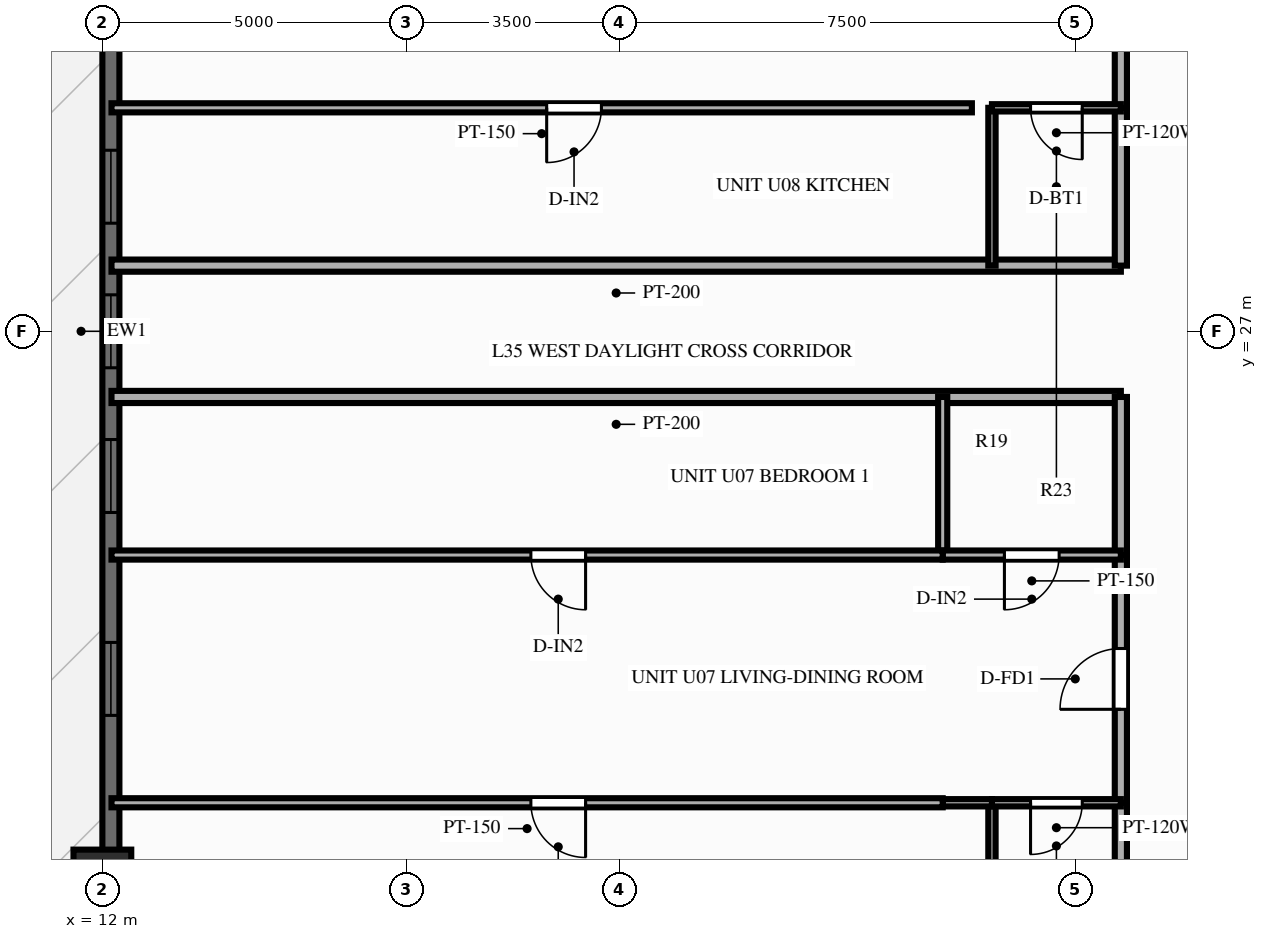
"""IFC4 building model, lengths in metres.
Left out: names, types, materials, properties, quantities, classifications, styles, units other than length and angle.
Written with IfcOpenShell. Run it as: python <this file> out.ifc"""

import sys

from ifc_helpers import new_model, si_unit, direction, frame, frame_2d, origin, origin_2d, place, context, subcontext, project, spatial, rectangle, extrude, source, transform, mapped, element, fill, save


model = new_model("IFC4")
c1 = context("Model", 3, precision=1e-05, world=origin(), true_north=direction((0.0, 1.0)))
c2 = subcontext(c1, "Body", "Model", "MODEL_VIEW")
j1 = project(units=[si_unit("LENGTHUNIT", "METRE"), si_unit("PLANEANGLEUNIT", "RADIAN")], contexts=[c1])
p1 = place(None, origin())
s1 = spatial("IfcSite", under=j1, at=p1, CompositionType="ELEMENT")
p2 = place(p1, origin())
s2 = spatial("IfcBuilding", under=s1, at=p2, CompositionType="ELEMENT")
p3 = place(p2, frame((0.0, 0.0, 110.85)))
s3 = spatial("IfcBuildingStorey", under=s2, at=p3, CompositionType="ELEMENT", Elevation=110.85)
m1 = source(origin(), c2, "Body", "SweptSolid", [
    extrude(rectangle(XDim=0.95, YDim=0.95, at=origin_2d()), origin(), (0.0, 0.0, 1.0), 3.0),
])
p4 = place(p3, frame((12.0, 18.0, 0.0), z_axis=(0.0, 0.0, 1.0), x_axis=(1.0, 0.0, 0.0)))
e1 = element("IfcColumn", 1, at=p4, inside=s3, PredefinedType="COLUMN", context=c2, shape_type="MappedRepresentation", body=[
    mapped(m1, transform((0.0, 0.0, 0.0), scale=1.0)),
])
p5 = place(p3, frame((12.14, 7.2, 0.0), z_axis=(0.0, 0.0, 1.0), x_axis=(0.0, 1.0, 0.0)))
e2 = element("IfcWall", 2, at=p5, inside=s3, PredefinedType="SOLIDWALL", context=c2, shape_type="SweptSolid", body=[
    extrude(rectangle(XDim=39.6, YDim=0.28, at=frame_2d((19.8, 0.0))), origin(), (0.0, 0.0, 1.0), 2.28),
])
p6 = place(p5, frame((0.945, 0.0, 0.25)))
e3 = element("IfcOpeningElement", 3, at=p6, cuts=e2, PredefinedType="OPENING", context=c2, shape_type="SweptSolid", body=[
    extrude(rectangle(XDim=1.2, YDim=1.5, at=frame_2d((0.6, 0.75))), frame((0.0, 0.152, 0.0), z_axis=(0.0, -1.0, 0.0), x_axis=(1.0, 0.0, 0.0)), (0.0, 0.0, 1.0), 0.304),
])
p7 = place(p5, frame((4.213, 0.0, 0.25)))
e4 = element("IfcOpeningElement", 4, at=p7, cuts=e2, PredefinedType="OPENING", context=c2, shape_type="SweptSolid", body=[
    extrude(rectangle(XDim=1.2, YDim=1.5, at=frame_2d((0.6, 0.75))), frame((0.0, 0.152, 0.0), z_axis=(0.0, -1.0, 0.0), x_axis=(1.0, 0.0, 0.0)), (0.0, 0.0, 1.0), 0.304),
])
p8 = place(p5, frame((7.55, 0.0, 0.25)))
e5 = element("IfcOpeningElement", 5, at=p8, cuts=e2, PredefinedType="OPENING", context=c2, shape_type="SweptSolid", body=[
    extrude(rectangle(XDim=1.2, YDim=1.5, at=frame_2d((0.6, 0.75))), frame((0.0, 0.152, 0.0), z_axis=(0.0, -1.0, 0.0), x_axis=(1.0, 0.0, 0.0)), (0.0, 0.0, 1.0), 0.304),
])
p9 = place(p5, frame((13.483, 0.0, 0.25)))
e6 = element("IfcOpeningElement", 6, at=p9, cuts=e2, PredefinedType="OPENING", context=c2, shape_type="SweptSolid", body=[
    extrude(rectangle(XDim=1.2, YDim=1.5, at=frame_2d((0.6, 0.75))), frame((0.0, 0.152, 0.0), z_axis=(0.0, -1.0, 0.0), x_axis=(1.0, 0.0, 0.0)), (0.0, 0.0, 1.0), 0.304),
])
p10 = place(p5, frame((16.82, 0.0, 0.25)))
e7 = element("IfcOpeningElement", 7, at=p10, cuts=e2, PredefinedType="OPENING", context=c2, shape_type="SweptSolid", body=[
    extrude(rectangle(XDim=1.2, YDim=1.5, at=frame_2d((0.6, 0.75))), frame((0.0, 0.152, 0.0), z_axis=(0.0, -1.0, 0.0), x_axis=(1.0, 0.0, 0.0)), (0.0, 0.0, 1.0), 0.304),
])
p11 = place(p5, frame((19.2, 0.0, 0.25)))
e8 = element("IfcOpeningElement", 8, at=p11, cuts=e2, PredefinedType="OPENING", context=c2, shape_type="SweptSolid", body=[
    extrude(rectangle(XDim=1.2, YDim=1.5, at=frame_2d((0.6, 0.75))), frame((0.0, 0.152, 0.0), z_axis=(0.0, -1.0, 0.0), x_axis=(1.0, 0.0, 0.0)), (0.0, 0.0, 1.0), 0.304),
])
p12 = place(p5, frame((21.578, 0.0, 0.25)))
e9 = element("IfcOpeningElement", 9, at=p12, cuts=e2, PredefinedType="OPENING", context=c2, shape_type="SweptSolid", body=[
    extrude(rectangle(XDim=1.2, YDim=1.5, at=frame_2d((0.6, 0.75))), frame((0.0, 0.152, 0.0), z_axis=(0.0, -1.0, 0.0), x_axis=(1.0, 0.0, 0.0)), (0.0, 0.0, 1.0), 0.304),
])
p13 = place(p5, frame((24.713, 0.0, 0.0)))
e10 = element("IfcOpeningElement", 10, at=p13, cuts=e2, PredefinedType="OPENING", context=c2, shape_type="SweptSolid", body=[
    extrude(rectangle(XDim=1.6, YDim=2.15, at=frame_2d((0.8, 1.075))), frame((0.0, 0.152, 0.0), z_axis=(0.0, -1.0, 0.0), x_axis=(1.0, 0.0, 0.0)), (0.0, 0.0, 1.0), 0.304),
])
p14 = place(p5, frame((29.305, 0.0, 0.25)))
e11 = element("IfcOpeningElement", 11, at=p14, cuts=e2, PredefinedType="OPENING", context=c2, shape_type="SweptSolid", body=[
    extrude(rectangle(XDim=0.7, YDim=1.5, at=frame_2d((0.35, 0.75))), frame((0.0, 0.152, 0.0), z_axis=(0.0, -1.0, 0.0), x_axis=(1.0, 0.0, 0.0)), (0.0, 0.0, 1.0), 0.304),
])
p15 = place(p5, frame((30.848, 0.0, 0.25)))
e12 = element("IfcOpeningElement", 12, at=p15, cuts=e2, PredefinedType="OPENING", context=c2, shape_type="SweptSolid", body=[
    extrude(rectangle(XDim=1.2, YDim=1.5, at=frame_2d((0.6, 0.75))), frame((0.0, 0.152, 0.0), z_axis=(0.0, -1.0, 0.0), x_axis=(1.0, 0.0, 0.0)), (0.0, 0.0, 1.0), 0.304),
])
p16 = place(p5, frame((34.183, 0.0, 0.25)))
e13 = element("IfcOpeningElement", 13, at=p16, cuts=e2, PredefinedType="OPENING", context=c2, shape_type="SweptSolid", body=[
    extrude(rectangle(XDim=1.2, YDim=1.5, at=frame_2d((0.6, 0.75))), frame((0.0, 0.152, 0.0), z_axis=(0.0, -1.0, 0.0), x_axis=(1.0, 0.0, 0.0)), (0.0, 0.0, 1.0), 0.304),
])
p17 = place(p5, frame((37.452, 0.0, 0.25)))
e14 = element("IfcOpeningElement", 14, at=p17, cuts=e2, PredefinedType="OPENING", context=c2, shape_type="SweptSolid", body=[
    extrude(rectangle(XDim=1.2, YDim=1.5, at=frame_2d((0.6, 0.75))), frame((0.0, 0.152, 0.0), z_axis=(0.0, -1.0, 0.0), x_axis=(1.0, 0.0, 0.0)), (0.0, 0.0, 1.0), 0.304),
])
p18 = place(p3, frame((28.75, 25.92, 0.0), z_axis=(0.0, 0.0, 1.0), x_axis=(-1.0, 0.0, 0.0)))
e15 = element("IfcWall", 15, at=p18, inside=s3, PredefinedType="PARTITIONING", context=c2, shape_type="SweptSolid", body=[
    extrude(rectangle(XDim=16.6, YDim=0.2, at=frame_2d((8.3, 0.0))), origin(), (0.0, 0.0, 1.0), 2.79),
])
p19 = place(p3, frame((28.75, 16.65, 0.0), z_axis=(0.0, 0.0, 1.0), x_axis=(0.0, 1.0, 0.0)))
e16 = element("IfcWall", 16, at=p19, inside=s3, PredefinedType="PARTITIONING", context=c2, shape_type="SweptSolid", body=[
    extrude(rectangle(XDim=2.596, YDim=0.2, at=frame_2d((1.298, 0.0))), origin(), (0.0, 0.0, 1.0), 2.79),
])
p20 = place(p3, frame((28.75, 19.246, 0.0), z_axis=(0.0, 0.0, 1.0), x_axis=(0.0, 1.0, 0.0)))
e17 = element("IfcWall", 17, at=p20, inside=s3, PredefinedType="PARTITIONING", context=c2, shape_type="SweptSolid", body=[
    extrude(rectangle(XDim=4.074, YDim=0.2, at=frame_2d((2.037, 0.0))), origin(), (0.0, 0.0, 1.0), 2.79),
])
p21 = place(p20, frame((1.537, 0.0, 0.0)))
e18 = element("IfcOpeningElement", 18, at=p21, cuts=e17, PredefinedType="OPENING", context=c2, shape_type="SweptSolid", body=[
    extrude(rectangle(XDim=1.0, YDim=2.15, at=frame_2d((0.5, 1.075))), frame((0.0, 0.112, 0.0), z_axis=(0.0, -1.0, 0.0), x_axis=(1.0, 0.0, 0.0)), (0.0, 0.0, 1.0), 0.224),
])
p22 = place(p3, frame((28.75, 23.32, 0.0), z_axis=(0.0, 0.0, 1.0), x_axis=(0.0, 1.0, 0.0)))
e19 = element("IfcWall", 19, at=p22, inside=s3, PredefinedType="PARTITIONING", context=c2, shape_type="SweptSolid", body=[
    extrude(rectangle(XDim=2.6, YDim=0.2, at=frame_2d((1.3, 0.0))), origin(), (0.0, 0.0, 1.0), 2.79),
])
p23 = place(p3, frame((26.63, 16.65, 0.0), z_axis=(0.0, 0.0, 1.0), x_axis=(0.0, 1.0, 0.0)))
e20 = element("IfcWall", 20, at=p23, inside=s3, PredefinedType="PARTITIONING", context=c2, shape_type="SweptSolid", body=[
    extrude(rectangle(XDim=2.596, YDim=0.12, at=frame_2d((1.298, 0.0))), origin(), (0.0, 0.0, 1.0), 2.79),
])
p24 = place(p3, frame((25.82, 23.32, 0.0), z_axis=(0.0, 0.0, 1.0), x_axis=(0.0, 1.0, 0.0)))
e21 = element("IfcWall", 21, at=p24, inside=s3, PredefinedType="PARTITIONING", context=c2, shape_type="SweptSolid", body=[
    extrude(rectangle(XDim=2.6, YDim=0.15, at=frame_2d((1.3, 0.0))), origin(), (0.0, 0.0, 1.0), 2.79),
])
p25 = place(p3, frame((28.75, 19.246, 0.0), z_axis=(0.0, 0.0, 1.0), x_axis=(-1.0, 0.0, 0.0)))
e22 = element("IfcWall", 22, at=p25, inside=s3, PredefinedType="PARTITIONING", context=c2, shape_type="SweptSolid", body=[
    extrude(rectangle(XDim=2.12, YDim=0.12, at=frame_2d((1.06, 0.0))), origin(), (0.0, 0.0, 1.0), 2.79),
])
p26 = place(p25, frame((0.635, 0.0, 0.0)))
e23 = element("IfcOpeningElement", 23, at=p26, cuts=e22, PredefinedType="OPENING", context=c2, shape_type="SweptSolid", body=[
    extrude(rectangle(XDim=0.85, YDim=2.05, at=frame_2d((0.425, 1.025))), frame((0.0, 0.072, 0.0), z_axis=(0.0, -1.0, 0.0), x_axis=(1.0, 0.0, 0.0)), (0.0, 0.0, 1.0), 0.144),
])
p27 = place(p3, frame((26.63, 19.246, 0.0), z_axis=(0.0, 0.0, 1.0), x_axis=(-1.0, 0.0, 0.0)))
e24 = element("IfcWall", 24, at=p27, inside=s3, PredefinedType="PARTITIONING", context=c2, shape_type="SweptSolid", body=[
    extrude(rectangle(XDim=0.81, YDim=0.12, at=frame_2d((0.405, 0.0))), origin(), (0.0, 0.0, 1.0), 2.79),
])
p28 = place(p3, frame((25.82, 19.246, 0.0), z_axis=(0.0, 0.0, 1.0), x_axis=(-1.0, 0.0, 0.0)))
e25 = element("IfcWall", 25, at=p28, inside=s3, PredefinedType="PARTITIONING", context=c2, shape_type="SweptSolid", body=[
    extrude(rectangle(XDim=13.67, YDim=0.15, at=frame_2d((6.835, 0.0))), origin(), (0.0, 0.0, 1.0), 2.79),
])
p29 = place(p28, frame((5.873, 0.0, 0.0)))
e26 = element("IfcOpeningElement", 26, at=p29, cuts=e25, PredefinedType="OPENING", context=c2, shape_type="SweptSolid", body=[
    extrude(rectangle(XDim=0.9, YDim=2.1, at=frame_2d((0.45, 1.05))), frame((0.0, 0.087, 0.0), z_axis=(0.0, -1.0, 0.0), x_axis=(1.0, 0.0, 0.0)), (0.0, 0.0, 1.0), 0.174),
])
p30 = place(p3, frame((28.75, 23.32, 0.0), z_axis=(0.0, 0.0, 1.0), x_axis=(-1.0, 0.0, 0.0)))
e27 = element("IfcWall", 27, at=p30, inside=s3, PredefinedType="PARTITIONING", context=c2, shape_type="SweptSolid", body=[
    extrude(rectangle(XDim=2.93, YDim=0.15, at=frame_2d((1.465, 0.0))), origin(), (0.0, 0.0, 1.0), 2.79),
])
p31 = place(p30, frame((1.015, 0.0, 0.0)))
e28 = element("IfcOpeningElement", 28, at=p31, cuts=e27, PredefinedType="OPENING", context=c2, shape_type="SweptSolid", body=[
    extrude(rectangle(XDim=0.9, YDim=2.1, at=frame_2d((0.45, 1.05))), frame((0.0, 0.087, 0.0), z_axis=(0.0, -1.0, 0.0), x_axis=(1.0, 0.0, 0.0)), (0.0, 0.0, 1.0), 0.174),
])
p32 = place(p3, frame((25.82, 23.32, 0.0), z_axis=(0.0, 0.0, 1.0), x_axis=(-1.0, 0.0, 0.0)))
e29 = element("IfcWall", 29, at=p32, inside=s3, PredefinedType="PARTITIONING", context=c2, shape_type="SweptSolid", body=[
    extrude(rectangle(XDim=13.67, YDim=0.15, at=frame_2d((6.835, 0.0))), origin(), (0.0, 0.0, 1.0), 2.79),
])
p33 = place(p32, frame((5.873, 0.0, 0.0)))
e30 = element("IfcOpeningElement", 30, at=p33, cuts=e29, PredefinedType="OPENING", context=c2, shape_type="SweptSolid", body=[
    extrude(rectangle(XDim=0.9, YDim=2.1, at=frame_2d((0.45, 1.05))), frame((0.0, 0.087, 0.0), z_axis=(0.0, -1.0, 0.0), x_axis=(1.0, 0.0, 0.0)), (0.0, 0.0, 1.0), 0.174),
])
p34 = place(p3, frame((28.75, 28.08, 0.0), z_axis=(0.0, 0.0, 1.0), x_axis=(-1.0, 0.0, 0.0)))
e31 = element("IfcWall", 31, at=p34, inside=s3, PredefinedType="PARTITIONING", context=c2, shape_type="SweptSolid", body=[
    extrude(rectangle(XDim=16.6, YDim=0.2, at=frame_2d((8.3, 0.0))), origin(), (0.0, 0.0, 1.0), 2.79),
])
p35 = place(p3, frame((28.75, 28.08, 0.0), z_axis=(0.0, 0.0, 1.0), x_axis=(0.0, 1.0, 0.0)))
e32 = element("IfcWall", 32, at=p35, inside=s3, PredefinedType="PARTITIONING", context=c2, shape_type="SweptSolid", body=[
    extrude(rectangle(XDim=2.595, YDim=0.2, at=frame_2d((1.298, 0.0))), origin(), (0.0, 0.0, 1.0), 2.79),
])
p36 = place(p3, frame((28.75, 30.676, 0.0), z_axis=(0.0, 0.0, 1.0), x_axis=(0.0, 1.0, 0.0)))
e33 = element("IfcWall", 33, at=p36, inside=s3, PredefinedType="PARTITIONING", context=c2, shape_type="SweptSolid", body=[
    extrude(rectangle(XDim=4.074, YDim=0.2, at=frame_2d((2.037, 0.0))), origin(), (0.0, 0.0, 1.0), 2.79),
])
p37 = place(p36, frame((1.537, 0.0, 0.0)))
e34 = element("IfcOpeningElement", 34, at=p37, cuts=e33, PredefinedType="OPENING", context=c2, shape_type="SweptSolid", body=[
    extrude(rectangle(XDim=1.0, YDim=2.15, at=frame_2d((0.5, 1.075))), frame((0.0, 0.112, 0.0), z_axis=(0.0, -1.0, 0.0), x_axis=(1.0, 0.0, 0.0)), (0.0, 0.0, 1.0), 0.224),
])
p38 = place(p3, frame((26.63, 28.08, 0.0), z_axis=(0.0, 0.0, 1.0), x_axis=(0.0, 1.0, 0.0)))
e35 = element("IfcWall", 35, at=p38, inside=s3, PredefinedType="PARTITIONING", context=c2, shape_type="SweptSolid", body=[
    extrude(rectangle(XDim=2.595, YDim=0.12, at=frame_2d((1.298, 0.0))), origin(), (0.0, 0.0, 1.0), 2.79),
])
p39 = place(p3, frame((28.75, 30.676, 0.0), z_axis=(0.0, 0.0, 1.0), x_axis=(-1.0, 0.0, 0.0)))
e36 = element("IfcWall", 36, at=p39, inside=s3, PredefinedType="PARTITIONING", context=c2, shape_type="SweptSolid", body=[
    extrude(rectangle(XDim=2.12, YDim=0.12, at=frame_2d((1.06, 0.0))), origin(), (0.0, 0.0, 1.0), 2.79),
])
p40 = place(p39, frame((0.635, 0.0, 0.0)))
e37 = element("IfcOpeningElement", 37, at=p40, cuts=e36, PredefinedType="OPENING", context=c2, shape_type="SweptSolid", body=[
    extrude(rectangle(XDim=0.85, YDim=2.05, at=frame_2d((0.425, 1.025))), frame((0.0, 0.072, 0.0), z_axis=(0.0, -1.0, 0.0), x_axis=(1.0, 0.0, 0.0)), (0.0, 0.0, 1.0), 0.144),
])
p41 = place(p3, frame((26.3, 30.676, 0.0), z_axis=(0.0, 0.0, 1.0), x_axis=(-1.0, 0.0, 0.0)))
e38 = element("IfcWall", 38, at=p41, inside=s3, PredefinedType="PARTITIONING", context=c2, shape_type="SweptSolid", body=[
    extrude(rectangle(XDim=14.15, YDim=0.15, at=frame_2d((7.075, 0.0))), origin(), (0.0, 0.0, 1.0), 2.79),
])
p42 = place(p41, frame((6.093, 0.0, 0.0)))
e39 = element("IfcOpeningElement", 39, at=p42, cuts=e38, PredefinedType="OPENING", context=c2, shape_type="SweptSolid", body=[
    extrude(rectangle(XDim=0.9, YDim=2.1, at=frame_2d((0.45, 1.05))), frame((0.0, 0.087, 0.0), z_axis=(0.0, -1.0, 0.0), x_axis=(1.0, 0.0, 0.0)), (0.0, 0.0, 1.0), 0.174),
])
m2 = source(origin(), c2, "Body", "SweptSolid", [
    extrude(rectangle(XDim=1.2, YDim=1.5, at=frame_2d((0.6, 0.75))), frame((0.0, 0.03, 0.0), z_axis=(0.0, -1.0, 0.0), x_axis=(1.0, 0.0, 0.0)), (0.0, 0.0, 1.0), 0.06),
])
p43 = place(p9, origin())
e40 = element("IfcWindow", 40, at=p43, inside=s3, PartitioningType="SINGLE_PANEL", PredefinedType="WINDOW", context=c2, shape_type="MappedRepresentation", body=[
    mapped(m2, transform((0.0, 0.0, 0.0), scale=1.0)),
])
fill(e6, e40)
p44 = place(p10, origin())
e41 = element("IfcWindow", 41, at=p44, inside=s3, PartitioningType="SINGLE_PANEL", PredefinedType="WINDOW", context=c2, shape_type="MappedRepresentation", body=[
    mapped(m2, transform((0.0, 0.0, 0.0), scale=1.0)),
])
fill(e7, e41)
p45 = place(p11, origin())
e42 = element("IfcWindow", 42, at=p45, inside=s3, PartitioningType="SINGLE_PANEL", PredefinedType="WINDOW", context=c2, shape_type="MappedRepresentation", body=[
    mapped(m2, transform((0.0, 0.0, 0.0), scale=1.0)),
])
fill(e8, e42)
p46 = place(p12, origin())
e43 = element("IfcWindow", 43, at=p46, inside=s3, PartitioningType="SINGLE_PANEL", PredefinedType="WINDOW", context=c2, shape_type="MappedRepresentation", body=[
    mapped(m2, transform((0.0, 0.0, 0.0), scale=1.0)),
])
fill(e9, e43)
m3 = source(origin(), c2, "Body", "SweptSolid", [
    extrude(rectangle(XDim=1.0, YDim=2.15, at=frame_2d((0.5, 1.075))), frame((0.0, 0.025, 0.0), z_axis=(0.0, -1.0, 0.0), x_axis=(1.0, 0.0, 0.0)), (0.0, 0.0, 1.0), 0.05),
])
p47 = place(p21, origin())
e44 = element("IfcDoor", 44, at=p47, inside=s3, OperationType="SINGLE_SWING_LEFT", PredefinedType="DOOR", context=c2, shape_type="MappedRepresentation", body=[
    mapped(m3, transform((0.0, 0.0, 0.0), scale=1.0)),
])
fill(e18, e44)
m4 = source(origin(), c2, "Body", "SweptSolid", [
    extrude(rectangle(XDim=0.85, YDim=2.05, at=frame_2d((0.425, 1.025))), frame((0.0, 0.025, 0.0), z_axis=(0.0, -1.0, 0.0), x_axis=(1.0, 0.0, 0.0)), (0.0, 0.0, 1.0), 0.05),
])
p48 = place(p26, origin())
e45 = element("IfcDoor", 45, at=p48, inside=s3, OperationType="SINGLE_SWING_RIGHT", PredefinedType="DOOR", context=c2, shape_type="MappedRepresentation", body=[
    mapped(m4, transform((0.0, 0.0, 0.0), scale=1.0)),
])
fill(e23, e45)
m5 = source(origin(), c2, "Body", "SweptSolid", [
    extrude(rectangle(XDim=0.9, YDim=2.1, at=frame_2d((0.45, 1.05))), frame((0.0, 0.025, 0.0), z_axis=(0.0, -1.0, 0.0), x_axis=(1.0, 0.0, 0.0)), (0.0, 0.0, 1.0), 0.05),
])
p49 = place(p29, origin())
e46 = element("IfcDoor", 46, at=p49, inside=s3, OperationType="SINGLE_SWING_LEFT", PredefinedType="DOOR", context=c2, shape_type="MappedRepresentation", body=[
    mapped(m5, transform((0.0, 0.0, 0.0), scale=1.0)),
])
fill(e26, e46)
p50 = place(p31, origin())
e47 = element("IfcDoor", 47, at=p50, inside=s3, OperationType="SINGLE_SWING_RIGHT", PredefinedType="DOOR", context=c2, shape_type="MappedRepresentation", body=[
    mapped(m5, transform((0.0, 0.0, 0.0), scale=1.0)),
])
fill(e28, e47)
p51 = place(p33, origin())
e48 = element("IfcDoor", 48, at=p51, inside=s3, OperationType="SINGLE_SWING_LEFT", PredefinedType="DOOR", context=c2, shape_type="MappedRepresentation", body=[
    mapped(m5, transform((0.0, 0.0, 0.0), scale=1.0)),
])
fill(e30, e48)
p52 = place(p40, origin())
e49 = element("IfcDoor", 49, at=p52, inside=s3, OperationType="SINGLE_SWING_LEFT", PredefinedType="DOOR", context=c2, shape_type="MappedRepresentation", body=[
    mapped(m4, transform((0.0, 0.0, 0.0), scale=1.0)),
])
fill(e37, e49)
p53 = place(p42, origin())
e50 = element("IfcDoor", 50, at=p53, inside=s3, OperationType="SINGLE_SWING_RIGHT", PredefinedType="DOOR", context=c2, shape_type="MappedRepresentation", body=[
    mapped(m5, transform((0.0, 0.0, 0.0), scale=1.0)),
])
fill(e39, e50)
save(model, sys.argv[1])
